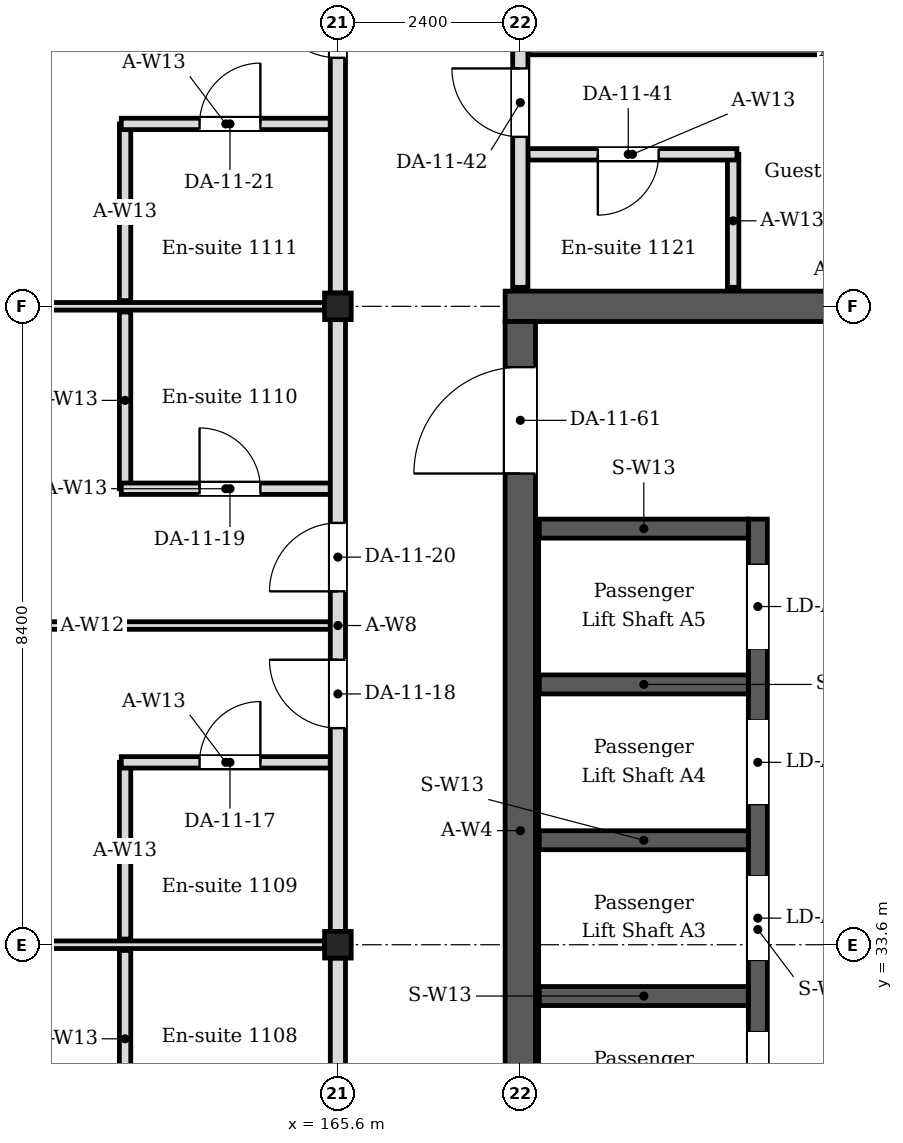
"""IFC4 building model, lengths in metres.
Left out: names, types, materials, properties, quantities, classifications, styles, units other than length and angle.
Written with IfcOpenShell. Run it as: python <this file> out.ifc"""

import sys

from ifc_helpers import new_model, si_unit, direction, frame, frame_2d, origin, origin_2d, place, context, subcontext, project, spatial, rectangle, i_section, extrude, element, fill, save


model = new_model("IFC4")
c1 = context("Model", 3, precision=1e-05, world=origin(), true_north=direction((0.0, 1.0)))
c2 = subcontext(c1, "Body", "Model", "MODEL_VIEW")
j1 = project(units=[si_unit("LENGTHUNIT", "METRE"), si_unit("PLANEANGLEUNIT", "RADIAN")], contexts=[c1])
p1 = place(None, origin())
s1 = spatial("IfcSite", under=j1, at=p1, CompositionType="ELEMENT")
p2 = place(p1, origin())
s2 = spatial("IfcBuilding", under=s1, at=p2, CompositionType="ELEMENT")
p3 = place(p2, frame((0.0, 0.0, 48.0)))
s3 = spatial("IfcBuildingStorey", under=s2, at=p3, CompositionType="ELEMENT", Elevation=48.0)
for number, where, z_axis, x_axis in (
    (1, (165.6, 33.6, 0.0), (0.0, 0.0, 1.0), (1.0, 0.0, 0.0)),
    (2, (165.6, 42.0, 0.0), (0.0, 0.0, 1.0), (1.0, 0.0, 0.0)),
):
    element("IfcColumn", number, at=place(p3, frame(where, z_axis=z_axis, x_axis=x_axis)), inside=s3, PredefinedType="COLUMN", context=c2, shape_type="SweptSolid", body=[
        extrude(i_section(OverallWidth=0.35, OverallDepth=0.35, WebThickness=0.012, FlangeThickness=0.019, FilletRadius=0.013, at=origin_2d()), origin(), (0.0, 0.0, 1.0), 4.2),
    ])
p4 = place(p3, frame((167.8, 42.0, 0.0), z_axis=(0.0, 0.0, 1.0), x_axis=(1.0, 0.0, 0.0)))
e3 = element("IfcWall", 3, at=p4, inside=s3, PredefinedType="SOLIDWALL", context=c2, shape_type="SweptSolid", body=[
    extrude(rectangle(XDim=8.8, YDim=0.4, at=frame_2d((4.4, 0.0))), origin(), (0.0, 0.0, 1.0), 4.05),
])
p5 = place(p3, frame((168.0, 25.4, 0.0), z_axis=(0.0, 0.0, 1.0), x_axis=(0.0, 1.0, 0.0)))
e4 = element("IfcWall", 4, at=p5, inside=s3, PredefinedType="SOLIDWALL", context=c2, shape_type="SweptSolid", body=[
    extrude(rectangle(XDim=16.4, YDim=0.4, at=frame_2d((8.2, 0.0))), origin(), (0.0, 0.0, 1.0), 4.05),
])
p6 = place(p5, frame((1.0, 0.0, 0.0)))
e5 = element("IfcOpeningElement", 5, at=p6, cuts=e4, PredefinedType="OPENING", context=c2, shape_type="SweptSolid", body=[
    extrude(rectangle(XDim=1.0, YDim=2.1, at=frame_2d((0.5, 1.05))), frame((0.0, 0.21, 0.0), z_axis=(0.0, -1.0, 0.0), x_axis=(1.0, 0.0, 0.0)), (0.0, 0.0, 1.0), 0.42),
])
p7 = place(p5, frame((14.4, 0.0, 0.0)))
e6 = element("IfcOpeningElement", 6, at=p7, cuts=e4, PredefinedType="OPENING", context=c2, shape_type="SweptSolid", body=[
    extrude(rectangle(XDim=1.4, YDim=2.1, at=frame_2d((0.7, 1.05))), frame((0.0, 0.21, 0.0), z_axis=(0.0, -1.0, 0.0), x_axis=(1.0, 0.0, 0.0)), (0.0, 0.0, 1.0), 0.42),
])
for number, where, z_axis, x_axis in (
    (7, (162.8, 31.2, 0.0), (0.0, 0.0, 1.0), (0.0, 1.0, 0.0)),
    (8, (162.8, 33.675, 0.0), (0.0, 0.0, 1.0), (0.0, 1.0, 0.0)),
):
    element("IfcWall", number, at=place(p3, frame(where, z_axis=z_axis, x_axis=x_axis)), inside=s3, PredefinedType="PARTITIONING", context=c2, shape_type="SweptSolid", body=[
        extrude(rectangle(XDim=2.325, YDim=0.15, at=frame_2d((1.163, 0.0))), origin(), (0.0, 0.0, 1.0), 4.05),
    ])
p8 = place(p3, frame((162.75, 36.0, 0.0), z_axis=(0.0, 0.0, 1.0), x_axis=(1.0, 0.0, 0.0)))
e9 = element("IfcWall", 9, at=p8, inside=s3, PredefinedType="PARTITIONING", context=c2, shape_type="SweptSolid", body=[
    extrude(rectangle(XDim=2.75, YDim=0.15, at=frame_2d((1.375, 0.0))), origin(), (0.0, 0.0, 1.0), 4.05),
])
p9 = place(p8, frame((1.03, 0.0, 0.0)))
e10 = element("IfcOpeningElement", 10, at=p9, cuts=e9, PredefinedType="OPENING", context=c2, shape_type="SweptSolid", body=[
    extrude(rectangle(XDim=0.8, YDim=2.1, at=frame_2d((0.4, 1.05))), frame((0.0, 0.085, 0.0), z_axis=(0.0, -1.0, 0.0), x_axis=(1.0, 0.0, 0.0)), (0.0, 0.0, 1.0), 0.17),
])
p10 = place(p3, frame((162.8, 39.6, 0.0), z_axis=(0.0, 0.0, 1.0), x_axis=(0.0, 1.0, 0.0)))
e11 = element("IfcWall", 11, at=p10, inside=s3, PredefinedType="PARTITIONING", context=c2, shape_type="SweptSolid", body=[
    extrude(rectangle(XDim=2.325, YDim=0.15, at=frame_2d((1.163, 0.0))), origin(), (0.0, 0.0, 1.0), 4.05),
])
p11 = place(p3, frame((162.75, 39.6, 0.0), z_axis=(0.0, 0.0, 1.0), x_axis=(1.0, 0.0, 0.0)))
e12 = element("IfcWall", 12, at=p11, inside=s3, PredefinedType="PARTITIONING", context=c2, shape_type="SweptSolid", body=[
    extrude(rectangle(XDim=2.75, YDim=0.15, at=frame_2d((1.375, 0.0))), origin(), (0.0, 0.0, 1.0), 4.05),
])
p12 = place(p11, frame((1.03, 0.0, 0.0)))
e13 = element("IfcOpeningElement", 13, at=p12, cuts=e12, PredefinedType="OPENING", context=c2, shape_type="SweptSolid", body=[
    extrude(rectangle(XDim=0.8, YDim=2.1, at=frame_2d((0.4, 1.05))), frame((0.0, 0.085, 0.0), z_axis=(0.0, -1.0, 0.0), x_axis=(1.0, 0.0, 0.0)), (0.0, 0.0, 1.0), 0.17),
])
p13 = place(p3, frame((162.8, 42.075, 0.0), z_axis=(0.0, 0.0, 1.0), x_axis=(0.0, 1.0, 0.0)))
e14 = element("IfcWall", 14, at=p13, inside=s3, PredefinedType="PARTITIONING", context=c2, shape_type="SweptSolid", body=[
    extrude(rectangle(XDim=2.325, YDim=0.15, at=frame_2d((1.163, 0.0))), origin(), (0.0, 0.0, 1.0), 4.05),
])
p14 = place(p3, frame((162.75, 44.4, 0.0), z_axis=(0.0, 0.0, 1.0), x_axis=(1.0, 0.0, 0.0)))
e15 = element("IfcWall", 15, at=p14, inside=s3, PredefinedType="PARTITIONING", context=c2, shape_type="SweptSolid", body=[
    extrude(rectangle(XDim=2.75, YDim=0.15, at=frame_2d((1.375, 0.0))), origin(), (0.0, 0.0, 1.0), 4.05),
])
p15 = place(p14, frame((1.03, 0.0, 0.0)))
e16 = element("IfcOpeningElement", 16, at=p15, cuts=e15, PredefinedType="OPENING", context=c2, shape_type="SweptSolid", body=[
    extrude(rectangle(XDim=0.8, YDim=2.1, at=frame_2d((0.4, 1.05))), frame((0.0, 0.085, 0.0), z_axis=(0.0, -1.0, 0.0), x_axis=(1.0, 0.0, 0.0)), (0.0, 0.0, 1.0), 0.17),
])
p16 = place(p3, frame((170.8, 42.25, 0.0), z_axis=(0.0, 0.0, 1.0), x_axis=(0.0, 1.0, 0.0)))
e17 = element("IfcWall", 17, at=p16, inside=s3, PredefinedType="PARTITIONING", context=c2, shape_type="SweptSolid", body=[
    extrude(rectangle(XDim=1.75, YDim=0.15, at=frame_2d((0.875, 0.0))), origin(), (0.0, 0.0, 1.0), 4.05),
])
p17 = place(p3, frame((170.85, 44.0, 0.0), z_axis=(0.0, 0.0, 1.0), x_axis=(-1.0, 0.0, 0.0)))
e18 = element("IfcWall", 18, at=p17, inside=s3, PredefinedType="PARTITIONING", context=c2, shape_type="SweptSolid", body=[
    extrude(rectangle(XDim=2.75, YDim=0.15, at=frame_2d((1.375, 0.0))), origin(), (0.0, 0.0, 1.0), 4.05),
])
p18 = place(p17, frame((1.03, 0.0, 0.0)))
e19 = element("IfcOpeningElement", 19, at=p18, cuts=e18, PredefinedType="OPENING", context=c2, shape_type="SweptSolid", body=[
    extrude(rectangle(XDim=0.8, YDim=2.1, at=frame_2d((0.4, 1.05))), frame((0.0, 0.085, 0.0), z_axis=(0.0, -1.0, 0.0), x_axis=(1.0, 0.0, 0.0)), (0.0, 0.0, 1.0), 0.17),
])
for number, where, z_axis, x_axis in (
    (20, (157.375, 33.6, 0.0), (0.0, 0.0, 1.0), (1.0, 0.0, 0.0)),
    (21, (157.375, 42.0, 0.0), (0.0, 0.0, 1.0), (1.0, 0.0, 0.0)),
):
    element("IfcWall", number, at=place(p3, frame(where, z_axis=z_axis, x_axis=x_axis)), inside=s3, PredefinedType="PARTITIONING", context=c2, shape_type="SweptSolid", body=[
        extrude(rectangle(XDim=8.05, YDim=0.1, at=frame_2d((4.025, 0.0))), origin(), (0.0, 0.0, 1.0), 3.604),
    ])
p19 = place(p3, frame((159.24, 37.8, 0.0), z_axis=(0.0, 0.0, 1.0), x_axis=(1.0, 0.0, 0.0)))
e22 = element("IfcWall", 22, at=p19, inside=s3, PredefinedType="PARTITIONING", context=c2, shape_type="SweptSolid", body=[
    extrude(rectangle(XDim=6.26, YDim=0.1, at=frame_2d((3.13, 0.0))), origin(), (0.0, 0.0, 1.0), 3.604),
])
p20 = place(p3, frame((168.1, 45.36, 0.0), z_axis=(0.0, 0.0, 1.0), x_axis=(1.0, 0.0, 0.0)))
e23 = element("IfcWall", 23, at=p20, inside=s3, PredefinedType="PARTITIONING", context=c2, shape_type="SweptSolid", body=[
    extrude(rectangle(XDim=8.52, YDim=0.1, at=frame_2d((4.26, 0.0))), origin(), (0.0, 0.0, 1.0), 3.604),
])
p21 = place(p3, frame((165.6, 25.375, 0.0), z_axis=(0.0, 0.0, 1.0), x_axis=(0.0, 1.0, 0.0)))
e24 = element("IfcWall", 24, at=p21, inside=s3, PredefinedType="PARTITIONING", context=c2, shape_type="SweptSolid", body=[
    extrude(rectangle(XDim=8.05, YDim=0.2, at=frame_2d((4.025, 0.0))), origin(), (0.0, 0.0, 1.0), 3.45),
])
p22 = place(p21, frame((2.675, 0.0, 0.0)))
e25 = element("IfcOpeningElement", 25, at=p22, cuts=e24, PredefinedType="OPENING", context=c2, shape_type="SweptSolid", body=[
    extrude(rectangle(XDim=0.9, YDim=2.1, at=frame_2d((0.45, 1.05))), frame((0.0, 0.11, 0.0), z_axis=(0.0, -1.0, 0.0), x_axis=(1.0, 0.0, 0.0)), (0.0, 0.0, 1.0), 0.22),
])
p23 = place(p21, frame((4.475, 0.0, 0.0)))
e26 = element("IfcOpeningElement", 26, at=p23, cuts=e24, PredefinedType="OPENING", context=c2, shape_type="SweptSolid", body=[
    extrude(rectangle(XDim=0.9, YDim=2.1, at=frame_2d((0.45, 1.05))), frame((0.0, 0.11, 0.0), z_axis=(0.0, -1.0, 0.0), x_axis=(1.0, 0.0, 0.0)), (0.0, 0.0, 1.0), 0.22),
])
p24 = place(p3, frame((165.6, 33.775, 0.0), z_axis=(0.0, 0.0, 1.0), x_axis=(0.0, 1.0, 0.0)))
e27 = element("IfcWall", 27, at=p24, inside=s3, PredefinedType="PARTITIONING", context=c2, shape_type="SweptSolid", body=[
    extrude(rectangle(XDim=8.05, YDim=0.2, at=frame_2d((4.025, 0.0))), origin(), (0.0, 0.0, 1.0), 3.45),
])
p25 = place(p24, frame((2.675, 0.0, 0.0)))
e28 = element("IfcOpeningElement", 28, at=p25, cuts=e27, PredefinedType="OPENING", context=c2, shape_type="SweptSolid", body=[
    extrude(rectangle(XDim=0.9, YDim=2.1, at=frame_2d((0.45, 1.05))), frame((0.0, 0.11, 0.0), z_axis=(0.0, -1.0, 0.0), x_axis=(1.0, 0.0, 0.0)), (0.0, 0.0, 1.0), 0.22),
])
p26 = place(p24, frame((4.475, 0.0, 0.0)))
e29 = element("IfcOpeningElement", 29, at=p26, cuts=e27, PredefinedType="OPENING", context=c2, shape_type="SweptSolid", body=[
    extrude(rectangle(XDim=0.9, YDim=2.1, at=frame_2d((0.45, 1.05))), frame((0.0, 0.11, 0.0), z_axis=(0.0, -1.0, 0.0), x_axis=(1.0, 0.0, 0.0)), (0.0, 0.0, 1.0), 0.22),
])
p27 = place(p3, frame((165.6, 42.175, 0.0), z_axis=(0.0, 0.0, 1.0), x_axis=(0.0, 1.0, 0.0)))
e30 = element("IfcWall", 30, at=p27, inside=s3, PredefinedType="PARTITIONING", context=c2, shape_type="SweptSolid", body=[
    extrude(rectangle(XDim=8.05, YDim=0.2, at=frame_2d((4.025, 0.0))), origin(), (0.0, 0.0, 1.0), 3.45),
])
p28 = place(p27, frame((3.095, 0.0, 0.0)))
e31 = element("IfcOpeningElement", 31, at=p28, cuts=e30, PredefinedType="OPENING", context=c2, shape_type="SweptSolid", body=[
    extrude(rectangle(XDim=0.9, YDim=2.1, at=frame_2d((0.45, 1.05))), frame((0.0, 0.11, 0.0), z_axis=(0.0, -1.0, 0.0), x_axis=(1.0, 0.0, 0.0)), (0.0, 0.0, 1.0), 0.22),
])
p29 = place(p27, frame((5.095, 0.0, 0.0)))
e32 = element("IfcOpeningElement", 32, at=p29, cuts=e30, PredefinedType="OPENING", context=c2, shape_type="SweptSolid", body=[
    extrude(rectangle(XDim=0.9, YDim=2.1, at=frame_2d((0.45, 1.05))), frame((0.0, 0.11, 0.0), z_axis=(0.0, -1.0, 0.0), x_axis=(1.0, 0.0, 0.0)), (0.0, 0.0, 1.0), 0.22),
])
p30 = place(p3, frame((168.0, 42.25, 0.0), z_axis=(0.0, 0.0, 1.0), x_axis=(0.0, 1.0, 0.0)))
e33 = element("IfcWall", 33, at=p30, inside=s3, PredefinedType="PARTITIONING", context=c2, shape_type="SweptSolid", body=[
    extrude(rectangle(XDim=7.975, YDim=0.2, at=frame_2d((3.988, 0.0))), origin(), (0.0, 0.0, 1.0), 3.45),
])
p31 = place(p30, frame((1.98, 0.0, 0.0)))
e34 = element("IfcOpeningElement", 34, at=p31, cuts=e33, PredefinedType="OPENING", context=c2, shape_type="SweptSolid", body=[
    extrude(rectangle(XDim=0.9, YDim=2.1, at=frame_2d((0.45, 1.05))), frame((0.0, 0.11, 0.0), z_axis=(0.0, -1.0, 0.0), x_axis=(1.0, 0.0, 0.0)), (0.0, 0.0, 1.0), 0.22),
])
p32 = place(p30, frame((3.98, 0.0, 0.0)))
e35 = element("IfcOpeningElement", 35, at=p32, cuts=e33, PredefinedType="OPENING", context=c2, shape_type="SweptSolid", body=[
    extrude(rectangle(XDim=0.9, YDim=2.1, at=frame_2d((0.45, 1.05))), frame((0.0, 0.11, 0.0), z_axis=(0.0, -1.0, 0.0), x_axis=(1.0, 0.0, 0.0)), (0.0, 0.0, 1.0), 0.22),
])
p33 = place(p3, frame((171.125, 28.3, 0.0), z_axis=(0.0, 0.0, 1.0), x_axis=(0.0, 1.0, 0.0)))
e36 = element("IfcWall", 36, at=p33, inside=s3, PredefinedType="SOLIDWALL", context=c2, shape_type="SweptSolid", body=[
    extrude(rectangle(XDim=10.9, YDim=0.25, at=frame_2d((5.45, 0.0))), origin(), (0.0, 0.0, 1.0), 4.05),
])
p34 = place(p33, frame((0.8, 0.0, 0.0)))
e37 = element("IfcOpeningElement", 37, at=p34, cuts=e36, PredefinedType="OPENING", context=c2, shape_type="SweptSolid", body=[
    extrude(rectangle(XDim=1.1, YDim=2.1, at=frame_2d((0.55, 1.05))), frame((0.0, 0.135, 0.0), z_axis=(0.0, -1.0, 0.0), x_axis=(1.0, 0.0, 0.0)), (0.0, 0.0, 1.0), 0.27),
])
p35 = place(p33, frame((3.05, 0.0, 0.0)))
e38 = element("IfcOpeningElement", 38, at=p35, cuts=e36, PredefinedType="OPENING", context=c2, shape_type="SweptSolid", body=[
    extrude(rectangle(XDim=1.1, YDim=2.1, at=frame_2d((0.55, 1.05))), frame((0.0, 0.135, 0.0), z_axis=(0.0, -1.0, 0.0), x_axis=(1.0, 0.0, 0.0)), (0.0, 0.0, 1.0), 0.27),
])
p36 = place(p33, frame((5.1, 0.0, 0.0)))
e39 = element("IfcOpeningElement", 39, at=p36, cuts=e36, PredefinedType="OPENING", context=c2, shape_type="SweptSolid", body=[
    extrude(rectangle(XDim=1.1, YDim=2.1, at=frame_2d((0.55, 1.05))), frame((0.0, 0.135, 0.0), z_axis=(0.0, -1.0, 0.0), x_axis=(1.0, 0.0, 0.0)), (0.0, 0.0, 1.0), 0.27),
])
p37 = place(p33, frame((7.15, 0.0, 0.0)))
e40 = element("IfcOpeningElement", 40, at=p37, cuts=e36, PredefinedType="OPENING", context=c2, shape_type="SweptSolid", body=[
    extrude(rectangle(XDim=1.1, YDim=2.1, at=frame_2d((0.55, 1.05))), frame((0.0, 0.135, 0.0), z_axis=(0.0, -1.0, 0.0), x_axis=(1.0, 0.0, 0.0)), (0.0, 0.0, 1.0), 0.27),
])
p38 = place(p33, frame((9.2, 0.0, 0.0)))
e41 = element("IfcOpeningElement", 41, at=p38, cuts=e36, PredefinedType="OPENING", context=c2, shape_type="SweptSolid", body=[
    extrude(rectangle(XDim=1.1, YDim=2.1, at=frame_2d((0.55, 1.05))), frame((0.0, 0.135, 0.0), z_axis=(0.0, -1.0, 0.0), x_axis=(1.0, 0.0, 0.0)), (0.0, 0.0, 1.0), 0.27),
])
for number, where, z_axis, x_axis in (
    (42, (168.25, 32.925, 0.0), (0.0, 0.0, 1.0), (1.0, 0.0, 0.0)),
    (43, (168.25, 34.975, 0.0), (0.0, 0.0, 1.0), (1.0, 0.0, 0.0)),
    (44, (168.25, 37.025, 0.0), (0.0, 0.0, 1.0), (1.0, 0.0, 0.0)),
    (45, (168.25, 39.075, 0.0), (0.0, 0.0, 1.0), (1.0, 0.0, 0.0)),
):
    element("IfcWall", number, at=place(p3, frame(where, z_axis=z_axis, x_axis=x_axis)), inside=s3, PredefinedType="SOLIDWALL", context=c2, shape_type="SweptSolid", body=[
        extrude(rectangle(XDim=2.75, YDim=0.25, at=frame_2d((1.375, 0.0))), origin(), (0.0, 0.0, 1.0), 4.05),
    ])
p39 = place(p9, origin())
e46 = element("IfcDoor", 46, at=p39, inside=s3, OperationType="SINGLE_SWING_RIGHT", PredefinedType="DOOR", context=c2, shape_type="SweptSolid", body=[
    extrude(rectangle(XDim=0.8, YDim=2.1, at=frame_2d((0.4, 1.05))), frame((0.0, 0.025, 0.0), z_axis=(0.0, -1.0, 0.0), x_axis=(1.0, 0.0, 0.0)), (0.0, 0.0, 1.0), 0.05),
])
fill(e10, e46)
p40 = place(p25, origin())
e47 = element("IfcDoor", 47, at=p40, inside=s3, OperationType="SINGLE_SWING_RIGHT", PredefinedType="DOOR", context=c2, shape_type="SweptSolid", body=[
    extrude(rectangle(XDim=0.9, YDim=2.1, at=frame_2d((0.45, 1.05))), frame((0.0, 0.025, 0.0), z_axis=(0.0, -1.0, 0.0), x_axis=(1.0, 0.0, 0.0)), (0.0, 0.0, 1.0), 0.05),
])
fill(e28, e47)
p41 = place(p12, origin())
e48 = element("IfcDoor", 48, at=p41, inside=s3, OperationType="SINGLE_SWING_LEFT", PredefinedType="DOOR", context=c2, shape_type="SweptSolid", body=[
    extrude(rectangle(XDim=0.8, YDim=2.1, at=frame_2d((0.4, 1.05))), frame((0.0, 0.025, 0.0), z_axis=(0.0, -1.0, 0.0), x_axis=(1.0, 0.0, 0.0)), (0.0, 0.0, 1.0), 0.05),
])
fill(e13, e48)
p42 = place(p26, origin())
e49 = element("IfcDoor", 49, at=p42, inside=s3, OperationType="SINGLE_SWING_LEFT", PredefinedType="DOOR", context=c2, shape_type="SweptSolid", body=[
    extrude(rectangle(XDim=0.9, YDim=2.1, at=frame_2d((0.45, 1.05))), frame((0.0, 0.025, 0.0), z_axis=(0.0, -1.0, 0.0), x_axis=(1.0, 0.0, 0.0)), (0.0, 0.0, 1.0), 0.05),
])
fill(e29, e49)
p43 = place(p15, origin())
e50 = element("IfcDoor", 50, at=p43, inside=s3, OperationType="SINGLE_SWING_RIGHT", PredefinedType="DOOR", context=c2, shape_type="SweptSolid", body=[
    extrude(rectangle(XDim=0.8, YDim=2.1, at=frame_2d((0.4, 1.05))), frame((0.0, 0.025, 0.0), z_axis=(0.0, -1.0, 0.0), x_axis=(1.0, 0.0, 0.0)), (0.0, 0.0, 1.0), 0.05),
])
fill(e16, e50)
p44 = place(p28, origin())
e51 = element("IfcDoor", 51, at=p44, inside=s3, OperationType="SINGLE_SWING_RIGHT", PredefinedType="DOOR", context=c2, shape_type="SweptSolid", body=[
    extrude(rectangle(XDim=0.9, YDim=2.1, at=frame_2d((0.45, 1.05))), frame((0.0, 0.025, 0.0), z_axis=(0.0, -1.0, 0.0), x_axis=(1.0, 0.0, 0.0)), (0.0, 0.0, 1.0), 0.05),
])
fill(e31, e51)
p45 = place(p18, origin())
e52 = element("IfcDoor", 52, at=p45, inside=s3, OperationType="SINGLE_SWING_RIGHT", PredefinedType="DOOR", context=c2, shape_type="SweptSolid", body=[
    extrude(rectangle(XDim=0.8, YDim=2.1, at=frame_2d((0.4, 1.05))), frame((0.0, 0.025, 0.0), z_axis=(0.0, -1.0, 0.0), x_axis=(1.0, 0.0, 0.0)), (0.0, 0.0, 1.0), 0.05),
])
fill(e19, e52)
p46 = place(p31, origin())
e53 = element("IfcDoor", 53, at=p46, inside=s3, OperationType="SINGLE_SWING_RIGHT", PredefinedType="DOOR", context=c2, shape_type="SweptSolid", body=[
    extrude(rectangle(XDim=0.9, YDim=2.1, at=frame_2d((0.45, 1.05))), frame((0.0, 0.025, 0.0), z_axis=(0.0, -1.0, 0.0), x_axis=(1.0, 0.0, 0.0)), (0.0, 0.0, 1.0), 0.05),
])
fill(e34, e53)
p47 = place(p35, origin())
e54 = element("IfcDoor", 54, at=p47, inside=s3, OperationType="SLIDING_TO_LEFT", PredefinedType="DOOR", context=c2, shape_type="SweptSolid", body=[
    extrude(rectangle(XDim=1.1, YDim=2.1, at=frame_2d((0.55, 1.05))), frame((0.0, 0.025, 0.0), z_axis=(0.0, -1.0, 0.0), x_axis=(1.0, 0.0, 0.0)), (0.0, 0.0, 1.0), 0.05),
])
fill(e38, e54)
p48 = place(p36, origin())
e55 = element("IfcDoor", 55, at=p48, inside=s3, OperationType="SLIDING_TO_LEFT", PredefinedType="DOOR", context=c2, shape_type="SweptSolid", body=[
    extrude(rectangle(XDim=1.1, YDim=2.1, at=frame_2d((0.55, 1.05))), frame((0.0, 0.025, 0.0), z_axis=(0.0, -1.0, 0.0), x_axis=(1.0, 0.0, 0.0)), (0.0, 0.0, 1.0), 0.05),
])
fill(e39, e55)
p49 = place(p37, origin())
e56 = element("IfcDoor", 56, at=p49, inside=s3, OperationType="SLIDING_TO_LEFT", PredefinedType="DOOR", context=c2, shape_type="SweptSolid", body=[
    extrude(rectangle(XDim=1.1, YDim=2.1, at=frame_2d((0.55, 1.05))), frame((0.0, 0.025, 0.0), z_axis=(0.0, -1.0, 0.0), x_axis=(1.0, 0.0, 0.0)), (0.0, 0.0, 1.0), 0.05),
])
fill(e40, e56)
p50 = place(p38, origin())
e57 = element("IfcDoor", 57, at=p50, inside=s3, OperationType="SLIDING_TO_LEFT", PredefinedType="DOOR", context=c2, shape_type="SweptSolid", body=[
    extrude(rectangle(XDim=1.1, YDim=2.1, at=frame_2d((0.55, 1.05))), frame((0.0, 0.025, 0.0), z_axis=(0.0, -1.0, 0.0), x_axis=(1.0, 0.0, 0.0)), (0.0, 0.0, 1.0), 0.05),
])
fill(e41, e57)
p51 = place(p7, origin())
e58 = element("IfcDoor", 58, at=p51, inside=s3, OperationType="DOUBLE_DOOR_DOUBLE_SWING", PredefinedType="DOOR", context=c2, shape_type="SweptSolid", body=[
    extrude(rectangle(XDim=1.4, YDim=2.1, at=frame_2d((0.7, 1.05))), frame((0.0, 0.025, 0.0), z_axis=(0.0, -1.0, 0.0), x_axis=(1.0, 0.0, 0.0)), (0.0, 0.0, 1.0), 0.05),
])
fill(e6, e58)
save(model, sys.argv[1])
